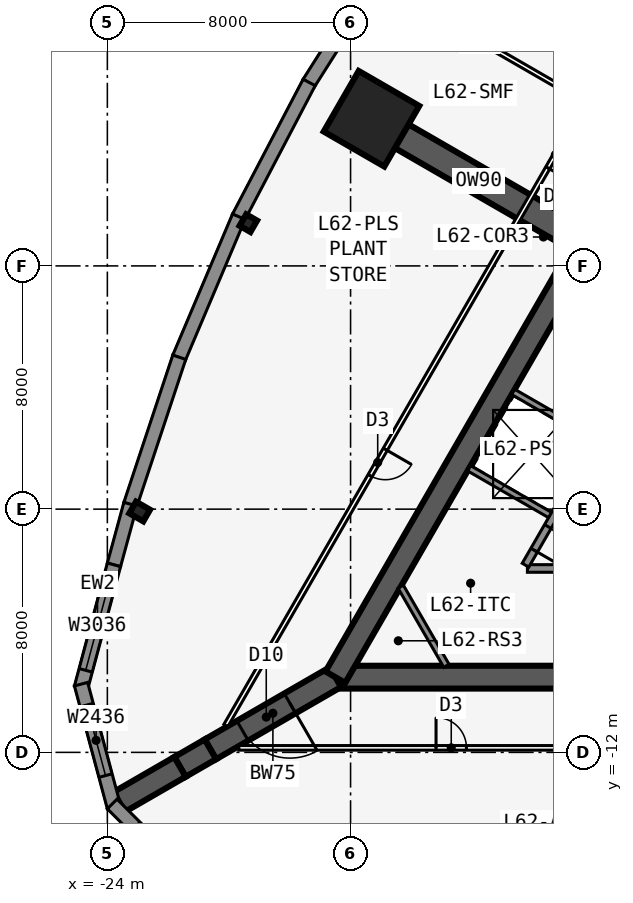
"""IFC4 building model, lengths in metres.
Left out: names, types, materials, properties, quantities, classifications, styles, units other than length and angle.
Written with IfcOpenShell. Run it as: python <this file> out.ifc"""

import sys

from ifc_helpers import new_model, si_unit, direction, frame, frame_2d, origin, origin_2d, place, context, subcontext, project, spatial, polyline, rectangle, i_section, outline, extrude, element, fill, save


model = new_model("IFC4")
c1 = context("Model", 3, precision=1e-05, world=origin(), true_north=direction((0.0, 1.0)))
c2 = subcontext(c1, "Body", "Model", "MODEL_VIEW")
j1 = project(units=[si_unit("LENGTHUNIT", "METRE"), si_unit("PLANEANGLEUNIT", "RADIAN")], contexts=[c1])
p1 = place(None, origin())
s1 = spatial("IfcSite", under=j1, at=p1, CompositionType="ELEMENT")
p2 = place(p1, origin())
s2 = spatial("IfcBuilding", under=s1, at=p2, CompositionType="ELEMENT")
p3 = place(p2, frame((0.0, 0.0, 233.3)))
s3 = spatial("IfcBuildingStorey", under=s2, at=p3, CompositionType="ELEMENT", Elevation=233.3)
p4 = place(p3, frame((-16.5, -9.526, 0.0), z_axis=(0.0, 0.0, 1.0), x_axis=(1.0, 0.0, 0.0)))
e1 = element("IfcWall", 1, at=p4, inside=s3, PredefinedType="SHEAR", context=c2, shape_type="SweptSolid", body=[
    extrude(rectangle(XDim=16.5, YDim=0.75, at=frame_2d((8.25, 0.0))), origin(), (0.0, 0.0, 1.0), 6.0),
])
p5 = place(p4, frame((14.05, 0.0, 0.0)))
e2 = element("IfcOpeningElement", 2, at=p5, cuts=e1, PredefinedType="OPENING", context=c2, shape_type="SweptSolid", body=[
    extrude(rectangle(XDim=1.8, YDim=2.13, at=frame_2d((0.9, 1.065))), frame((0.0, 0.385, 0.0), z_axis=(0.0, -1.0, 0.0), x_axis=(1.0, 0.0, 0.0)), (0.0, 0.0, 1.0), 0.77),
])
p6 = place(p3, frame((-10.183, -5.951, 0.0), z_axis=(0.0, 0.0, 1.0), x_axis=(1.0, 0.0, 0.0)))
e3 = element("IfcWall", 3, at=p6, inside=s3, PredefinedType="SOLIDWALL", context=c2, shape_type="SweptSolid", body=[
    extrude(rectangle(XDim=7.633, YDim=0.25, at=frame_2d((3.816, 0.0))), origin(), (0.0, 0.0, 1.0), 5.75),
])
p7 = place(p3, frame((-8.25, 4.763, 0.0), z_axis=(0.0, 0.0, 1.0), x_axis=(-0.499996545922, -0.866027397988, 0.0)))
e4 = element("IfcWall", 4, at=p7, inside=s3, PredefinedType="SHEAR", context=c2, shape_type="SweptSolid", body=[
    extrude(rectangle(XDim=16.5, YDim=0.75, at=frame_2d((8.25, 0.0))), origin(), (0.0, 0.0, 1.0), 6.0),
])
p8 = place(p3, frame((-4.929, 3.365, 0.0), z_axis=(0.0, 0.0, 1.0), x_axis=(-0.499991433582, -0.866030349552, 0.0)))
e5 = element("IfcWall", 5, at=p8, inside=s3, PredefinedType="SOLIDWALL", context=c2, shape_type="SweptSolid", body=[
    extrude(rectangle(XDim=10.633, YDim=0.25, at=frame_2d((5.316, 0.0))), origin(), (0.0, 0.0, 1.0), 5.75),
])
p9 = place(p8, frame((9.164, 0.0, 0.0)))
e6 = element("IfcOpeningElement", 6, at=p9, cuts=e5, PredefinedType="OPENING", context=c2, shape_type="SweptSolid", body=[
    extrude(rectangle(XDim=0.9, YDim=2.13, at=frame_2d((0.45, 1.065))), frame((0.0, 0.135, 0.0), z_axis=(0.0, -1.0, 0.0), x_axis=(1.0, 0.0, 0.0)), (0.0, 0.0, 1.0), 0.27),
])
p10 = place(p8, frame((1.1, 0.0, 0.0)))
e7 = element("IfcOpeningElement", 7, at=p10, cuts=e5, PredefinedType="OPENING", context=c2, shape_type="SweptSolid", body=[
    extrude(rectangle(XDim=0.9, YDim=2.13, at=frame_2d((0.45, 1.065))), frame((0.0, 0.135, 0.0), z_axis=(0.0, -1.0, 0.0), x_axis=(1.0, 0.0, 0.0)), (0.0, 0.0, 1.0), 0.27),
])
p11 = place(p8, frame((4.0, 0.0, 0.0)))
e8 = element("IfcOpeningElement", 8, at=p11, cuts=e5, PredefinedType="OPENING", context=c2, shape_type="SweptSolid", body=[
    extrude(rectangle(XDim=0.9, YDim=2.13, at=frame_2d((0.45, 1.065))), frame((0.0, 0.135, 0.0), z_axis=(0.0, -1.0, 0.0), x_axis=(1.0, 0.0, 0.0)), (0.0, 0.0, 1.0), 0.27),
])
p12 = place(p3, frame((-7.879, -1.744, 0.0), z_axis=(0.0, 0.0, 1.0), x_axis=(-0.866042017984, 0.499971222258, 0.0)))
e9 = element("IfcWall", 9, at=p12, inside=s3, PredefinedType="SOLIDWALL", context=c2, shape_type="SweptSolid", body=[
    extrude(rectangle(XDim=3.2, YDim=0.2, at=frame_2d((1.6, 0.0))), origin(), (0.0, 0.0, 1.0), 5.75),
])
p13 = place(p3, frame((-9.329, -4.256, 0.0), z_axis=(0.0, 0.0, 1.0), x_axis=(-0.866022944154, 0.50000426018, 0.0)))
e10 = element("IfcWall", 10, at=p13, inside=s3, PredefinedType="SOLIDWALL", context=c2, shape_type="SweptSolid", body=[
    extrude(rectangle(XDim=3.2, YDim=0.2, at=frame_2d((1.6, 0.0))), origin(), (0.0, 0.0, 1.0), 5.75),
])
p14 = place(p3, frame((-16.5, -9.526, 0.0), z_axis=(0.0, 0.0, 1.0), x_axis=(-0.866031398331, -0.499989616998, 0.0)))
e11 = element("IfcWall", 11, at=p14, inside=s3, PredefinedType="SHEAR", context=c2, shape_type="SweptSolid", body=[
    extrude(rectangle(XDim=4.746, YDim=0.75, at=frame_2d((2.373, 0.0))), origin(), (0.0, 0.0, 1.0), 6.0),
])
p15 = place(p14, frame((1.725, 0.0, 0.0)))
e12 = element("IfcOpeningElement", 12, at=p15, cuts=e11, PredefinedType="OPENING", context=c2, shape_type="SweptSolid", body=[
    extrude(rectangle(XDim=1.8, YDim=2.13, at=frame_2d((0.9, 1.065))), frame((0.0, 0.385, 0.0), z_axis=(0.0, -1.0, 0.0), x_axis=(1.0, 0.0, 0.0)), (0.0, 0.0, 1.0), 0.77),
])
p16 = place(p3, frame((-20.61, -11.899, 0.0), z_axis=(0.0, 0.0, 1.0), x_axis=(-0.866009537788, -0.500027479704, 0.0)))
e13 = element("IfcWall", 13, at=p16, inside=s3, PredefinedType="SHEAR", context=c2, shape_type="SweptSolid", body=[
    extrude(rectangle(XDim=1.155, YDim=0.75, at=frame_2d((0.577, 0.0))), origin(), (0.0, 0.0, 1.0), 6.0),
])
p17 = place(p3, frame((-21.61, -12.477, 0.0), z_axis=(0.0, 0.0, 1.0), x_axis=(-0.866055313784, -0.499948190782, 0.0)))
e14 = element("IfcWall", 14, at=p17, inside=s3, PredefinedType="SHEAR", context=c2, shape_type="SweptSolid", body=[
    extrude(rectangle(XDim=2.309, YDim=0.75, at=frame_2d((1.155, 0.0))), origin(), (0.0, 0.0, 1.0), 6.0),
])
p18 = place(p3, frame((-8.25, 4.763, 0.0), z_axis=(0.0, 0.0, 1.0), x_axis=(-0.866023543838, 0.500003221507, 0.0)))
e15 = element("IfcWall", 15, at=p18, inside=s3, PredefinedType="SHEAR", context=c2, shape_type="SweptSolid", body=[
    extrude(rectangle(XDim=8.154, YDim=0.9, at=frame_2d((4.077, 0.0))), origin(), (0.0, 0.0, 1.0), 6.0),
])
p19 = place(p3, frame((-19.363, 5.406, 0.0), z_axis=(0.0, 0.0, 1.0), x_axis=(-0.866025403784, 0.5, 0.0)))
e16 = element("IfcColumn", 16, at=p19, inside=s3, PredefinedType="COLUMN", context=c2, shape_type="SweptSolid", body=[
    extrude(i_section(OverallWidth=0.411, OverallDepth=0.434, WebThickness=0.036, FlangeThickness=0.057, at=origin_2d()), origin(), (0.0, 0.0, 1.0), 6.0),
])
p20 = place(p3, frame((-22.937, -4.078, 0.0), z_axis=(0.0, 0.0, 1.0), x_axis=(-0.5, -0.866025403784, 0.0)))
e17 = element("IfcColumn", 17, at=p20, inside=s3, PredefinedType="COLUMN", context=c2, shape_type="SweptSolid", body=[
    extrude(i_section(OverallWidth=0.442, OverallDepth=0.531, WebThickness=0.066, FlangeThickness=0.106, at=origin_2d()), origin(), (0.0, 0.0, 1.0), 6.0),
])
p21 = place(p3, frame((-15.312, 8.84, 0.0), z_axis=(0.0, 0.0, 1.0), x_axis=(-0.866025403784, 0.5, 0.0)))
e18 = element("IfcColumn", 18, at=p21, inside=s3, PredefinedType="COLUMN", context=c2, shape_type="SweptSolid", body=[
    extrude(rectangle(XDim=2.3, YDim=2.3, at=origin_2d()), origin(), (0.0, 0.0, 1.0), 6.0),
])
p22 = place(p3, frame((-14.693, 14.246, 0.0), z_axis=(0.0, 0.0, 1.0), x_axis=(-0.535242418236, -0.844698498709, 0.0)))
e19 = element("IfcWall", 19, at=p22, inside=s3, PredefinedType="SOLIDWALL", context=c2, shape_type="SweptSolid", body=[
    extrude(outline(polyline([(0.0, 0.0), (5.004, 0.0), (5.004, 5.75), (0.0, 5.75), (0.0, 0.0)]), holes=[polyline([(4.402, 2.875), (4.337, 3.367), (4.148, 3.825), (3.846, 4.219), (3.452, 4.52), (2.994, 4.71), (2.502, 4.775), (2.01, 4.71), (1.552, 4.52), (1.159, 4.219), (0.857, 3.825), (0.667, 3.367), (0.602, 2.875), (0.667, 2.383), (0.857, 1.925), (1.159, 1.531), (1.552, 1.229), (2.01, 1.04), (2.502, 0.975), (2.994, 1.04), (3.452, 1.229), (3.846, 1.531), (4.148, 1.925), (4.337, 2.383), (4.402, 2.875)])]), frame((0.0, 0.225, 0.0), z_axis=(0.0, -1.0, 0.0), x_axis=(1.0, 0.0, 0.0)), (0.0, 0.0, 1.0), 0.45),
])
p23 = place(p3, frame((-17.362, 10.034, 0.0), z_axis=(0.0, 0.0, 1.0), x_axis=(-0.463976002579, -0.885847768542, 0.0)))
e20 = element("IfcWall", 20, at=p23, inside=s3, PredefinedType="SOLIDWALL", context=c2, shape_type="SweptSolid", body=[
    extrude(outline(polyline([(0.0, 0.0), (5.004, 0.0), (5.004, 5.75), (0.0, 5.75), (0.0, 0.0)]), holes=[polyline([(4.402, 2.875), (4.337, 3.367), (4.147, 3.825), (3.846, 4.219), (3.452, 4.52), (2.994, 4.71), (2.502, 4.775), (2.01, 4.71), (1.552, 4.52), (1.159, 4.219), (0.857, 3.825), (0.667, 3.367), (0.602, 2.875), (0.667, 2.383), (0.857, 1.925), (1.159, 1.531), (1.552, 1.229), (2.01, 1.04), (2.502, 0.975), (2.994, 1.04), (3.452, 1.229), (3.846, 1.531), (4.147, 1.925), (4.337, 2.383), (4.402, 2.875)])]), frame((0.0, 0.225, 0.0), z_axis=(0.0, -1.0, 0.0), x_axis=(1.0, 0.0, 0.0)), (0.0, 0.0, 1.0), 0.45),
])
p24 = place(p3, frame((-19.676, 5.618, 0.0), z_axis=(0.0, 0.0, 1.0), x_axis=(-0.390038319149, -0.920798625974, 0.0)))
e21 = element("IfcWall", 21, at=p24, inside=s3, PredefinedType="SOLIDWALL", context=c2, shape_type="SweptSolid", body=[
    extrude(outline(polyline([(0.0, 0.0), (5.038, 0.0), (5.038, 5.75), (0.0, 5.75), (0.0, 0.0)]), holes=[polyline([(4.419, 2.875), (4.354, 3.367), (4.165, 3.825), (3.863, 4.219), (3.469, 4.52), (3.011, 4.71), (2.519, 4.775), (2.027, 4.71), (1.569, 4.52), (1.176, 4.219), (0.874, 3.825), (0.684, 3.367), (0.619, 2.875), (0.684, 2.383), (0.874, 1.925), (1.176, 1.531), (1.569, 1.229), (2.027, 1.04), (2.519, 0.975), (3.011, 1.04), (3.469, 1.229), (3.863, 1.531), (4.165, 1.925), (4.354, 2.383), (4.419, 2.875)])]), frame((0.0, 0.225, 0.0), z_axis=(0.0, -1.0, 0.0), x_axis=(1.0, 0.0, 0.0)), (0.0, 0.0, 1.0), 0.45),
])
p25 = place(p3, frame((-21.635, 0.996, 0.0), z_axis=(0.0, 0.0, 1.0), x_axis=(-0.315065402268, -0.949069961749, 0.0)))
e22 = element("IfcWall", 22, at=p25, inside=s3, PredefinedType="SOLIDWALL", context=c2, shape_type="SweptSolid", body=[
    extrude(outline(polyline([(0.0, 0.0), (5.105, 0.0), (5.105, 5.75), (0.0, 5.75), (0.0, 0.0)]), holes=[polyline([(4.502, 2.875), (4.436, 3.38), (4.241, 3.85), (3.931, 4.254), (3.527, 4.564), (3.057, 4.759), (2.552, 4.825), (2.048, 4.759), (1.577, 4.564), (1.174, 4.254), (0.864, 3.85), (0.669, 3.38), (0.602, 2.875), (0.669, 2.37), (0.864, 1.9), (1.174, 1.496), (1.577, 1.186), (2.048, 0.991), (2.552, 0.925), (3.057, 0.991), (3.527, 1.186), (3.931, 1.496), (4.241, 1.9), (4.436, 2.37), (4.502, 2.875)])]), frame((0.0, 0.225, 0.0), z_axis=(0.0, -1.0, 0.0), x_axis=(1.0, 0.0, 0.0)), (0.0, 0.0, 1.0), 0.45),
])
p26 = place(p3, frame((-23.239, -3.837, 0.0), z_axis=(0.0, 0.0, 1.0), x_axis=(-0.262867703986, -0.964831887015, 0.0)))
e23 = element("IfcWall", 23, at=p26, inside=s3, PredefinedType="SOLIDWALL", context=c2, shape_type="SweptSolid", body=[
    extrude(rectangle(XDim=2.068, YDim=0.45, at=frame_2d((1.034, 0.0))), origin(), (0.0, 0.0, 1.0), 5.75),
])
p27 = place(p3, frame((-23.783, -5.832, 0.0), z_axis=(0.0, 0.0, 1.0), x_axis=(-0.258784695888, -0.965935029479, 0.0)))
e24 = element("IfcWall", 24, at=p27, inside=s3, PredefinedType="SOLIDWALL", context=c2, shape_type="SweptSolid", body=[
    extrude(rectangle(XDim=4.184, YDim=0.45, at=frame_2d((2.092, 0.0))), origin(), (0.0, 0.0, 1.0), 5.75),
])
p28 = place(p27, frame((0.592, 0.0, 0.9)))
e25 = element("IfcOpeningElement", 25, at=p28, cuts=e24, PredefinedType="OPENING", context=c2, shape_type="SweptSolid", body=[
    extrude(rectangle(XDim=3.0, YDim=3.6, at=frame_2d((1.5, 1.8))), frame((0.0, 0.235, 0.0), z_axis=(0.0, -1.0, 0.0), x_axis=(1.0, 0.0, 0.0)), (0.0, 0.0, 1.0), 0.47),
])
p29 = place(p3, frame((-24.865, -9.757, 0.0), z_axis=(0.0, 0.0, 1.0), x_axis=(0.258799282522, -0.96593112144, 0.0)))
e26 = element("IfcWall", 26, at=p29, inside=s3, PredefinedType="SOLIDWALL", context=c2, shape_type="SweptSolid", body=[
    extrude(outline(polyline([(4.184, 0.225), (4.125, 0.225), (3.705, 0.113), (3.675, 0.225), (0.0, 0.225), (0.0, -0.225), (4.184, -0.225), (4.184, 0.225)])), origin(), (0.0, 0.0, 1.0), 5.75),
])
p30 = place(p29, frame((0.713, 0.0, 0.9)))
e27 = element("IfcOpeningElement", 27, at=p30, cuts=e26, PredefinedType="OPENING", context=c2, shape_type="SweptSolid", body=[
    extrude(rectangle(XDim=2.4, YDim=3.6, at=frame_2d((1.2, 1.8))), frame((0.0, 0.235, 0.0), z_axis=(0.0, -1.0, 0.0), x_axis=(1.0, 0.0, 0.0)), (0.0, 0.0, 1.0), 0.47),
])
p31 = place(p3, frame((-23.841, -13.697, 0.0), z_axis=(0.0, 0.0, 1.0), x_axis=(0.707077605902, -0.707135955267, 0.0)))
e28 = element("IfcWall", 28, at=p31, inside=s3, PredefinedType="SOLIDWALL", context=c2, shape_type="SweptSolid", body=[
    extrude(outline(polyline([(4.184, 0.225), (0.509, 0.225), (0.479, 0.113), (0.059, 0.225), (0.0, 0.225), (0.0, -0.225), (4.184, -0.225), (4.184, 0.225)])), origin(), (0.0, 0.0, 1.0), 5.75),
])
p32 = place(p31, frame((1.071, 0.0, 0.9)))
e29 = element("IfcOpeningElement", 29, at=p32, cuts=e28, PredefinedType="OPENING", context=c2, shape_type="SweptSolid", body=[
    extrude(rectangle(XDim=2.4, YDim=3.6, at=frame_2d((1.2, 1.8))), frame((0.0, 0.235, 0.0), z_axis=(0.0, -1.0, 0.0), x_axis=(1.0, 0.0, 0.0)), (0.0, 0.0, 1.0), 0.47),
])
p33 = place(p3, frame((-19.677, -11.851, 0.0), z_axis=(0.0, 0.0, 1.0), x_axis=(1.0, 0.0, 0.0)))
e30 = element("IfcWall", 30, at=p33, inside=s3, PredefinedType="PARTITIONING", context=c2, shape_type="SweptSolid", body=[
    extrude(rectangle(XDim=39.354, YDim=0.15, at=frame_2d((19.677, 0.0))), origin(), (0.0, 0.0, 1.0), 5.75),
])
p34 = place(p33, frame((6.489, 0.0, 0.0)))
e31 = element("IfcOpeningElement", 31, at=p34, cuts=e30, PredefinedType="OPENING", context=c2, shape_type="SweptSolid", body=[
    extrude(rectangle(XDim=1.0, YDim=2.13, at=frame_2d((0.5, 1.065))), frame((0.0, 0.085, 0.0), z_axis=(0.0, -1.0, 0.0), x_axis=(1.0, 0.0, 0.0)), (0.0, 0.0, 1.0), 0.17),
])
p35 = place(p33, frame((16.177, 0.0, 0.0)))
e32 = element("IfcOpeningElement", 32, at=p35, cuts=e30, PredefinedType="OPENING", context=c2, shape_type="SweptSolid", body=[
    extrude(rectangle(XDim=1.0, YDim=2.13, at=frame_2d((0.5, 1.065))), frame((0.0, 0.085, 0.0), z_axis=(0.0, -1.0, 0.0), x_axis=(1.0, 0.0, 0.0)), (0.0, 0.0, 1.0), 0.17),
])
p36 = place(p33, frame((28.865, 0.0, 0.0)))
e33 = element("IfcOpeningElement", 33, at=p36, cuts=e30, PredefinedType="OPENING", context=c2, shape_type="SweptSolid", body=[
    extrude(rectangle(XDim=1.0, YDim=2.13, at=frame_2d((0.5, 1.065))), frame((0.0, 0.085, 0.0), z_axis=(0.0, -1.0, 0.0), x_axis=(1.0, 0.0, 0.0)), (0.0, 0.0, 1.0), 0.17),
])
p37 = place(p3, frame((-0.425, 22.966, 0.0), z_axis=(0.0, 0.0, 1.0), x_axis=(-0.500000265775, -0.866025250339, 0.0)))
e34 = element("IfcWall", 34, at=p37, inside=s3, PredefinedType="PARTITIONING", context=c2, shape_type="SweptSolid", body=[
    extrude(rectangle(XDim=39.354, YDim=0.15, at=frame_2d((19.677, 0.0))), origin(), (0.0, 0.0, 1.0), 5.75),
])
p38 = place(p37, frame((7.489, 0.0, 0.0)))
e35 = element("IfcOpeningElement", 35, at=p38, cuts=e34, PredefinedType="OPENING", context=c2, shape_type="SweptSolid", body=[
    extrude(rectangle(XDim=1.0, YDim=2.13, at=frame_2d((0.5, 1.065))), frame((0.0, 0.085, 0.0), z_axis=(0.0, -1.0, 0.0), x_axis=(1.0, 0.0, 0.0)), (0.0, 0.0, 1.0), 0.17),
])
p39 = place(p37, frame((17.177, 0.0, 0.0)))
e36 = element("IfcOpeningElement", 36, at=p39, cuts=e34, PredefinedType="OPENING", context=c2, shape_type="SweptSolid", body=[
    extrude(rectangle(XDim=1.0, YDim=2.13, at=frame_2d((0.5, 1.065))), frame((0.0, 0.085, 0.0), z_axis=(0.0, -1.0, 0.0), x_axis=(1.0, 0.0, 0.0)), (0.0, 0.0, 1.0), 0.17),
])
p40 = place(p37, frame((28.865, 0.0, 0.0)))
e37 = element("IfcOpeningElement", 37, at=p40, cuts=e34, PredefinedType="OPENING", context=c2, shape_type="SweptSolid", body=[
    extrude(rectangle(XDim=1.0, YDim=2.13, at=frame_2d((0.5, 1.065))), frame((0.0, 0.085, 0.0), z_axis=(0.0, -1.0, 0.0), x_axis=(1.0, 0.0, 0.0)), (0.0, 0.0, 1.0), 0.17),
])
p41 = place(p3, frame((-8.329, 9.427, 0.0), z_axis=(0.0, 0.0, 1.0), x_axis=(-0.866027296944, 0.499996720937, 0.0)))
e38 = element("IfcWall", 38, at=p41, inside=s3, PredefinedType="PARTITIONING", context=c2, shape_type="SweptSolid", body=[
    extrude(rectangle(XDim=7.937, YDim=0.15, at=frame_2d((3.968, 0.0))), origin(), (0.0, 0.0, 1.0), 5.75),
])
p42 = place(p3, frame((-12.848, -9.151, 0.0), z_axis=(0.0, 0.0, 1.0), x_axis=(-0.499952404951, 0.866052881055, 0.0)))
e39 = element("IfcWall", 39, at=p42, inside=s3, PredefinedType="SOLIDWALL", context=c2, shape_type="SweptSolid", body=[
    extrude(rectangle(XDim=3.002, YDim=0.2, at=frame_2d((1.501, 0.0))), origin(), (0.0, 0.0, 1.0), 5.75),
])
p43 = place(p28, origin())
e40 = element("IfcWindow", 40, at=p43, inside=s3, PartitioningType="SINGLE_PANEL", PredefinedType="WINDOW", context=c2, shape_type="SweptSolid", body=[
    extrude(rectangle(XDim=3.0, YDim=3.6, at=frame_2d((1.5, 1.8))), frame((0.0, 0.03, 0.0), z_axis=(0.0, -1.0, 0.0), x_axis=(1.0, 0.0, 0.0)), (0.0, 0.0, 1.0), 0.06),
])
fill(e25, e40)
p44 = place(p30, origin())
e41 = element("IfcWindow", 41, at=p44, inside=s3, PartitioningType="SINGLE_PANEL", PredefinedType="WINDOW", context=c2, shape_type="SweptSolid", body=[
    extrude(rectangle(XDim=2.4, YDim=3.6, at=frame_2d((1.2, 1.8))), frame((0.0, 0.03, 0.0), z_axis=(0.0, -1.0, 0.0), x_axis=(1.0, 0.0, 0.0)), (0.0, 0.0, 1.0), 0.06),
])
fill(e27, e41)
p45 = place(p34, origin())
e42 = element("IfcDoor", 42, at=p45, inside=s3, OperationType="SINGLE_SWING_LEFT", PredefinedType="DOOR", context=c2, shape_type="SweptSolid", body=[
    extrude(rectangle(XDim=1.0, YDim=2.13, at=frame_2d((0.5, 1.065))), frame((0.0, 0.025, 0.0), z_axis=(0.0, -1.0, 0.0), x_axis=(1.0, 0.0, 0.0)), (0.0, 0.0, 1.0), 0.05),
])
fill(e31, e42)
p46 = place(p39, origin())
e43 = element("IfcDoor", 43, at=p46, inside=s3, OperationType="SINGLE_SWING_RIGHT", PredefinedType="DOOR", context=c2, shape_type="SweptSolid", body=[
    extrude(rectangle(XDim=1.0, YDim=2.13, at=frame_2d((0.5, 1.065))), frame((0.0, 0.025, 0.0), z_axis=(0.0, -1.0, 0.0), x_axis=(1.0, 0.0, 0.0)), (0.0, 0.0, 1.0), 0.05),
])
fill(e36, e43)
p47 = place(p40, origin())
e44 = element("IfcDoor", 44, at=p47, inside=s3, OperationType="SINGLE_SWING_LEFT", PredefinedType="DOOR", context=c2, shape_type="SweptSolid", body=[
    extrude(rectangle(XDim=1.0, YDim=2.13, at=frame_2d((0.5, 1.065))), frame((0.0, 0.025, 0.0), z_axis=(0.0, -1.0, 0.0), x_axis=(1.0, 0.0, 0.0)), (0.0, 0.0, 1.0), 0.05),
])
fill(e37, e44)
p48 = place(p15, origin())
e45 = element("IfcDoor", 45, at=p48, inside=s3, OperationType="DOUBLE_DOOR_DOUBLE_SWING", PredefinedType="DOOR", context=c2, shape_type="SweptSolid", body=[
    extrude(rectangle(XDim=1.8, YDim=2.13, at=frame_2d((0.9, 1.065))), frame((0.0, 0.025, 0.0), z_axis=(0.0, -1.0, 0.0), x_axis=(1.0, 0.0, 0.0)), (0.0, 0.0, 1.0), 0.05),
])
fill(e12, e45)
p49 = place(p9, origin())
e46 = element("IfcDoor", 46, at=p49, inside=s3, OperationType="SINGLE_SWING_RIGHT", PredefinedType="DOOR", context=c2, shape_type="SweptSolid", body=[
    extrude(rectangle(XDim=0.9, YDim=2.13, at=frame_2d((0.45, 1.065))), frame((0.0, 0.025, 0.0), z_axis=(0.0, -1.0, 0.0), x_axis=(1.0, 0.0, 0.0)), (0.0, 0.0, 1.0), 0.05),
])
fill(e6, e46)
save(model, sys.argv[1])
